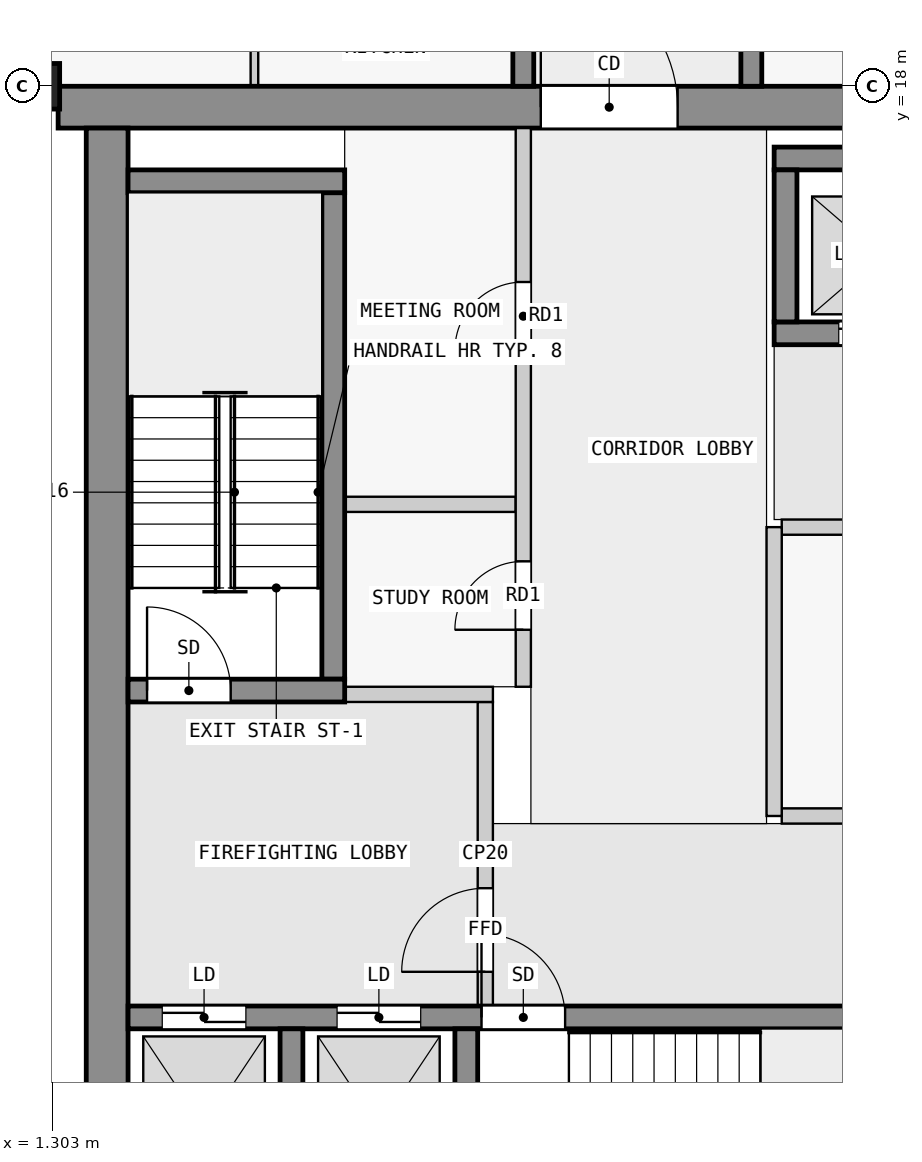
"""IFC4 building model, lengths in metres.
Left out: names, types, materials, properties, quantities, classifications, styles, units other than length and angle.
Written with IfcOpenShell. Run it as: python <this file> out.ifc"""

import sys

from ifc_helpers import new_model, si_unit, direction, frame, frame_2d, origin, origin_2d, place, context, subcontext, project, spatial, rectangle, extrude, element, fill, save


model = new_model("IFC4")
c1 = context("Model", 3, precision=1e-05, world=origin(), true_north=direction((0.0, 1.0)))
c2 = subcontext(c1, "Body", "Model", "MODEL_VIEW")
j1 = project(units=[si_unit("LENGTHUNIT", "METRE"), si_unit("PLANEANGLEUNIT", "RADIAN")], contexts=[c1])
p1 = place(None, origin())
s1 = spatial("IfcSite", under=j1, at=p1, CompositionType="ELEMENT")
p2 = place(p1, origin())
s2 = spatial("IfcBuilding", under=s1, at=p2, CompositionType="ELEMENT")
p3 = place(p2, frame((0.0, 0.0, 204.9)))
s3 = spatial("IfcBuildingStorey", under=s2, at=p3, CompositionType="ELEMENT", Elevation=204.9)
p4 = place(p3, frame((0.7, 18.0, 0.0), z_axis=(0.0, 0.0, 1.0), x_axis=(0.0, 1.0, 0.0)))
e1 = element("IfcColumn", 1, at=p4, inside=s3, PredefinedType="COLUMN", context=c2, shape_type="SweptSolid", body=[
    extrude(rectangle(XDim=0.6, YDim=1.4, at=origin_2d()), origin(), (0.0, 0.0, 1.0), 3.5),
])
p5 = place(p3, frame((1.38, 17.725, 0.0), z_axis=(0.0, 0.0, 1.0), x_axis=(1.0, 0.0, 0.0)))
e2 = element("IfcWall", 2, at=p5, inside=s3, PredefinedType="SHEAR", context=c2, shape_type="SweptSolid", body=[
    extrude(rectangle(XDim=21.12, YDim=0.55, at=frame_2d((10.56, 0.0))), origin(), (0.0, 0.0, 1.0), 3.25),
])
p6 = place(p5, frame((6.35, 0.0, 0.0)))
e3 = element("IfcOpeningElement", 3, at=p6, cuts=e2, PredefinedType="OPENING", context=c2, shape_type="SweptSolid", body=[
    extrude(rectangle(XDim=1.8, YDim=2.1, at=frame_2d((0.9, 1.05))), frame((0.0, 0.285, 0.0), z_axis=(0.0, -1.0, 0.0), x_axis=(1.0, 0.0, 0.0)), (0.0, 0.0, 1.0), 0.57),
])
p7 = place(p3, frame((2.025, 2.5, 0.0), z_axis=(0.0, 0.0, 1.0), x_axis=(0.0, 1.0, 0.0)))
e4 = element("IfcWall", 4, at=p7, inside=s3, PredefinedType="SHEAR", context=c2, shape_type="SweptSolid", body=[
    extrude(rectangle(XDim=14.95, YDim=0.55, at=frame_2d((7.475, 0.0))), origin(), (0.0, 0.0, 1.0), 3.25),
])
for number, where, z_axis, x_axis in (
    (5, (4.45, 2.8, 0.0), (0.0, 0.0, 1.0), (0.0, 1.0, 0.0)),
    (6, (6.75, 2.8, 0.0), (0.0, 0.0, 1.0), (0.0, 1.0, 0.0)),
):
    element("IfcWall", number, at=place(p3, frame(where, z_axis=z_axis, x_axis=x_axis)), inside=s3, PredefinedType="SHEAR", context=c2, shape_type="SweptSolid", body=[
        extrude(rectangle(XDim=2.8, YDim=0.3, at=frame_2d((1.4, 0.0))), origin(), (0.0, 0.0, 1.0), 3.25),
    ])
p8 = place(p3, frame((2.3, 5.75, 0.0), z_axis=(0.0, 0.0, 1.0), x_axis=(1.0, 0.0, 0.0)))
e7 = element("IfcWall", 7, at=p8, inside=s3, PredefinedType="SHEAR", context=c2, shape_type="SweptSolid", body=[
    extrude(rectangle(XDim=18.8, YDim=0.3, at=frame_2d((9.4, 0.0))), origin(), (0.0, 0.0, 1.0), 3.25),
])
p9 = place(p8, frame((4.65, 0.0, 0.0)))
e8 = element("IfcOpeningElement", 8, at=p9, cuts=e7, PredefinedType="OPENING", context=c2, shape_type="SweptSolid", body=[
    extrude(rectangle(XDim=1.1, YDim=2.1, at=frame_2d((0.55, 1.05))), frame((0.0, 0.16, 0.0), z_axis=(0.0, -1.0, 0.0), x_axis=(1.0, 0.0, 0.0)), (0.0, 0.0, 1.0), 0.32),
])
p10 = place(p8, frame((0.45, 0.0, 0.0)))
e9 = element("IfcOpeningElement", 9, at=p10, cuts=e7, PredefinedType="OPENING", context=c2, shape_type="SweptSolid", body=[
    extrude(rectangle(XDim=1.1, YDim=2.1, at=frame_2d((0.55, 1.05))), frame((0.0, 0.16, 0.0), z_axis=(0.0, -1.0, 0.0), x_axis=(1.0, 0.0, 0.0)), (0.0, 0.0, 1.0), 0.32),
])
p11 = place(p8, frame((2.75, 0.0, 0.0)))
e10 = element("IfcOpeningElement", 10, at=p11, cuts=e7, PredefinedType="OPENING", context=c2, shape_type="SweptSolid", body=[
    extrude(rectangle(XDim=1.1, YDim=2.1, at=frame_2d((0.55, 1.05))), frame((0.0, 0.16, 0.0), z_axis=(0.0, -1.0, 0.0), x_axis=(1.0, 0.0, 0.0)), (0.0, 0.0, 1.0), 0.32),
])
p12 = place(p8, frame((13.2, 0.0, 0.0)))
e11 = element("IfcOpeningElement", 11, at=p12, cuts=e7, PredefinedType="OPENING", context=c2, shape_type="SweptSolid", body=[
    extrude(rectangle(XDim=0.9, YDim=2.1, at=frame_2d((0.45, 1.05))), frame((0.0, 0.16, 0.0), z_axis=(0.0, -1.0, 0.0), x_axis=(1.0, 0.0, 0.0)), (0.0, 0.0, 1.0), 0.32),
])
p13 = place(p8, frame((16.95, 0.0, 0.0)))
e12 = element("IfcOpeningElement", 12, at=p13, cuts=e7, PredefinedType="OPENING", context=c2, shape_type="SweptSolid", body=[
    extrude(rectangle(XDim=0.9, YDim=2.1, at=frame_2d((0.45, 1.05))), frame((0.0, 0.16, 0.0), z_axis=(0.0, -1.0, 0.0), x_axis=(1.0, 0.0, 0.0)), (0.0, 0.0, 1.0), 0.32),
])
p14 = place(p3, frame((2.3, 10.05, 0.0), z_axis=(0.0, 0.0, 1.0), x_axis=(1.0, 0.0, 0.0)))
e13 = element("IfcWall", 13, at=p14, inside=s3, PredefinedType="SHEAR", context=c2, shape_type="SweptSolid", body=[
    extrude(rectangle(XDim=2.85, YDim=0.3, at=frame_2d((1.425, 0.0))), origin(), (0.0, 0.0, 1.0), 3.25),
])
p15 = place(p14, frame((0.25, 0.0, 0.0)))
e14 = element("IfcOpeningElement", 14, at=p15, cuts=e13, PredefinedType="OPENING", context=c2, shape_type="SweptSolid", body=[
    extrude(rectangle(XDim=1.1, YDim=2.1, at=frame_2d((0.55, 1.05))), frame((0.0, 0.16, 0.0), z_axis=(0.0, -1.0, 0.0), x_axis=(1.0, 0.0, 0.0)), (0.0, 0.0, 1.0), 0.32),
])
p16 = place(p3, frame((5.0, 10.2, 0.0), z_axis=(0.0, 0.0, 1.0), x_axis=(0.0, 1.0, 0.0)))
e15 = element("IfcWall", 15, at=p16, inside=s3, PredefinedType="SHEAR", context=c2, shape_type="SweptSolid", body=[
    extrude(rectangle(XDim=6.4, YDim=0.3, at=frame_2d((3.2, 0.0))), origin(), (0.0, 0.0, 1.0), 3.25),
])
p17 = place(p3, frame((2.3, 16.75, 0.0), z_axis=(0.0, 0.0, 1.0), x_axis=(1.0, 0.0, 0.0)))
e16 = element("IfcWall", 16, at=p17, inside=s3, PredefinedType="SHEAR", context=c2, shape_type="SweptSolid", body=[
    extrude(rectangle(XDim=2.85, YDim=0.3, at=frame_2d((1.425, 0.0))), origin(), (0.0, 0.0, 1.0), 3.25),
])
p18 = place(p3, frame((10.8, 17.05, 0.0), z_axis=(0.0, 0.0, 1.0), x_axis=(1.0, 0.0, 0.0)))
e17 = element("IfcWall", 17, at=p18, inside=s3, PredefinedType="SHEAR", context=c2, shape_type="SweptSolid", body=[
    extrude(rectangle(XDim=7.8, YDim=0.3, at=frame_2d((3.9, 0.0))), origin(), (0.0, 0.0, 1.0), 3.25),
])
p19 = place(p3, frame((10.8, 14.75, 0.0), z_axis=(0.0, 0.0, 1.0), x_axis=(1.0, 0.0, 0.0)))
e18 = element("IfcWall", 18, at=p19, inside=s3, PredefinedType="SHEAR", context=c2, shape_type="SweptSolid", body=[
    extrude(rectangle(XDim=7.8, YDim=0.3, at=frame_2d((3.9, 0.0))), origin(), (0.0, 0.0, 1.0), 3.25),
])
p20 = place(p19, frame((0.85, 0.0, 0.0)))
e19 = element("IfcOpeningElement", 19, at=p20, cuts=e18, PredefinedType="OPENING", context=c2, shape_type="SweptSolid", body=[
    extrude(rectangle(XDim=1.1, YDim=2.1, at=frame_2d((0.55, 1.05))), frame((0.0, 0.16, 0.0), z_axis=(0.0, -1.0, 0.0), x_axis=(1.0, 0.0, 0.0)), (0.0, 0.0, 1.0), 0.32),
])
p21 = place(p19, frame((3.35, 0.0, 0.0)))
e20 = element("IfcOpeningElement", 20, at=p21, cuts=e18, PredefinedType="OPENING", context=c2, shape_type="SweptSolid", body=[
    extrude(rectangle(XDim=1.1, YDim=2.1, at=frame_2d((0.55, 1.05))), frame((0.0, 0.16, 0.0), z_axis=(0.0, -1.0, 0.0), x_axis=(1.0, 0.0, 0.0)), (0.0, 0.0, 1.0), 0.32),
])
p22 = place(p19, frame((5.85, 0.0, 0.0)))
e21 = element("IfcOpeningElement", 21, at=p22, cuts=e18, PredefinedType="OPENING", context=c2, shape_type="SweptSolid", body=[
    extrude(rectangle(XDim=1.1, YDim=2.1, at=frame_2d((0.55, 1.05))), frame((0.0, 0.16, 0.0), z_axis=(0.0, -1.0, 0.0), x_axis=(1.0, 0.0, 0.0)), (0.0, 0.0, 1.0), 0.32),
])
p23 = place(p3, frame((10.95, 14.9, 0.0), z_axis=(0.0, 0.0, 1.0), x_axis=(0.0, 1.0, 0.0)))
e22 = element("IfcWall", 22, at=p23, inside=s3, PredefinedType="SHEAR", context=c2, shape_type="SweptSolid", body=[
    extrude(rectangle(XDim=2.0, YDim=0.3, at=frame_2d((1.0, 0.0))), origin(), (0.0, 0.0, 1.0), 3.25),
])
p24 = place(p3, frame((7.5, 18.0, 0.0), z_axis=(0.0, 0.0, 1.0), x_axis=(0.0, 1.0, 0.0)))
e23 = element("IfcWall", 23, at=p24, inside=s3, PredefinedType="SHEAR", context=c2, shape_type="SweptSolid", body=[
    extrude(rectangle(XDim=27.0, YDim=0.275, at=frame_2d((13.5, 0.0))), origin(), (0.0, 0.0, 1.0), 3.25),
])
p25 = place(p24, frame((1.75, 0.0, 0.0)))
e24 = element("IfcOpeningElement", 24, at=p25, cuts=e23, PredefinedType="OPENING", context=c2, shape_type="SweptSolid", body=[
    extrude(rectangle(XDim=1.0, YDim=2.1, at=frame_2d((0.5, 1.05))), frame((0.0, 0.147, 0.0), z_axis=(0.0, -1.0, 0.0), x_axis=(1.0, 0.0, 0.0)), (0.0, 0.0, 1.0), 0.295),
])
p26 = place(p24, frame((5.85, 0.0, 0.0)))
e25 = element("IfcOpeningElement", 25, at=p26, cuts=e23, PredefinedType="OPENING", context=c2, shape_type="SweptSolid", body=[
    extrude(rectangle(XDim=1.8, YDim=2.1, at=frame_2d((0.9, 1.05))), frame((0.0, 0.147, 0.0), z_axis=(0.0, -1.0, 0.0), x_axis=(1.0, 0.0, 0.0)), (0.0, 0.0, 1.0), 0.295),
])
p27 = place(p24, frame((13.05, 0.0, 0.0)))
e26 = element("IfcOpeningElement", 26, at=p27, cuts=e23, PredefinedType="OPENING", context=c2, shape_type="SweptSolid", body=[
    extrude(rectangle(XDim=1.0, YDim=2.1, at=frame_2d((0.5, 1.05))), frame((0.0, 0.147, 0.0), z_axis=(0.0, -1.0, 0.0), x_axis=(1.0, 0.0, 0.0)), (0.0, 0.0, 1.0), 0.295),
])
p28 = place(p24, frame((19.75, 0.0, 0.0)))
e27 = element("IfcOpeningElement", 27, at=p28, cuts=e23, PredefinedType="OPENING", context=c2, shape_type="SweptSolid", body=[
    extrude(rectangle(XDim=1.0, YDim=2.1, at=frame_2d((0.5, 1.05))), frame((0.0, 0.147, 0.0), z_axis=(0.0, -1.0, 0.0), x_axis=(1.0, 0.0, 0.0)), (0.0, 0.0, 1.0), 0.295),
])
p29 = place(p24, frame((23.25, 0.0, 0.0)))
e28 = element("IfcOpeningElement", 28, at=p29, cuts=e23, PredefinedType="OPENING", context=c2, shape_type="SweptSolid", body=[
    extrude(rectangle(XDim=0.9, YDim=2.1, at=frame_2d((0.45, 1.05))), frame((0.0, 0.147, 0.0), z_axis=(0.0, -1.0, 0.0), x_axis=(1.0, 0.0, 0.0)), (0.0, 0.0, 1.0), 0.295),
])
p30 = place(p24, frame((25.45, 0.0, 0.0)))
e29 = element("IfcOpeningElement", 29, at=p30, cuts=e23, PredefinedType="OPENING", context=c2, shape_type="SweptSolid", body=[
    extrude(rectangle(XDim=1.0, YDim=2.1, at=frame_2d((0.5, 1.05))), frame((0.0, 0.147, 0.0), z_axis=(0.0, -1.0, 0.0), x_axis=(1.0, 0.0, 0.0)), (0.0, 0.0, 1.0), 0.295),
])
p31 = place(p3, frame((10.5, 18.0, 0.0), z_axis=(0.0, 0.0, 1.0), x_axis=(0.0, 1.0, 0.0)))
e30 = element("IfcWall", 30, at=p31, inside=s3, PredefinedType="SHEAR", context=c2, shape_type="SweptSolid", body=[
    extrude(rectangle(XDim=27.0, YDim=0.275, at=frame_2d((13.5, 0.0))), origin(), (0.0, 0.0, 1.0), 3.25),
])
p32 = place(p31, frame((4.85, 0.0, 0.0)))
e31 = element("IfcOpeningElement", 31, at=p32, cuts=e30, PredefinedType="OPENING", context=c2, shape_type="SweptSolid", body=[
    extrude(rectangle(XDim=1.0, YDim=2.1, at=frame_2d((0.5, 1.05))), frame((0.0, 0.147, 0.0), z_axis=(0.0, -1.0, 0.0), x_axis=(1.0, 0.0, 0.0)), (0.0, 0.0, 1.0), 0.295),
])
p33 = place(p31, frame((15.25, 0.0, 0.0)))
e32 = element("IfcOpeningElement", 32, at=p33, cuts=e30, PredefinedType="OPENING", context=c2, shape_type="SweptSolid", body=[
    extrude(rectangle(XDim=1.0, YDim=2.1, at=frame_2d((0.5, 1.05))), frame((0.0, 0.147, 0.0), z_axis=(0.0, -1.0, 0.0), x_axis=(1.0, 0.0, 0.0)), (0.0, 0.0, 1.0), 0.295),
])
p34 = place(p31, frame((21.35, 0.0, 0.0)))
e33 = element("IfcOpeningElement", 33, at=p34, cuts=e30, PredefinedType="OPENING", context=c2, shape_type="SweptSolid", body=[
    extrude(rectangle(XDim=1.0, YDim=2.1, at=frame_2d((0.5, 1.05))), frame((0.0, 0.147, 0.0), z_axis=(0.0, -1.0, 0.0), x_axis=(1.0, 0.0, 0.0)), (0.0, 0.0, 1.0), 0.295),
])
p35 = place(p3, frame((7.0, 5.9, 0.0), z_axis=(0.0, 0.0, 1.0), x_axis=(0.0, 1.0, 0.0)))
e34 = element("IfcWall", 34, at=p35, inside=s3, PredefinedType="PARTITIONING", context=c2, shape_type="SweptSolid", body=[
    extrude(rectangle(XDim=4.0, YDim=0.2, at=frame_2d((2.0, 0.0))), origin(), (0.0, 0.0, 1.0), 3.25),
])
p36 = place(p35, frame((0.45, 0.0, 0.0)))
e35 = element("IfcOpeningElement", 35, at=p36, cuts=e34, PredefinedType="OPENING", context=c2, shape_type="SweptSolid", body=[
    extrude(rectangle(XDim=1.1, YDim=2.1, at=frame_2d((0.55, 1.05))), frame((0.0, 0.11, 0.0), z_axis=(0.0, -1.0, 0.0), x_axis=(1.0, 0.0, 0.0)), (0.0, 0.0, 1.0), 0.22),
])
p37 = place(p3, frame((5.15, 10.0, 0.0), z_axis=(0.0, 0.0, 1.0), x_axis=(1.0, 0.0, 0.0)))
e36 = element("IfcWall", 36, at=p37, inside=s3, PredefinedType="PARTITIONING", context=c2, shape_type="SweptSolid", body=[
    extrude(rectangle(XDim=1.95, YDim=0.2, at=frame_2d((0.975, 0.0))), origin(), (0.0, 0.0, 1.0), 3.25),
])
p38 = place(p3, frame((10.8, 8.4, 0.0), z_axis=(0.0, 0.0, 1.0), x_axis=(0.0, 1.0, 0.0)))
e37 = element("IfcWall", 37, at=p38, inside=s3, PredefinedType="PARTITIONING", context=c2, shape_type="SweptSolid", body=[
    extrude(rectangle(XDim=3.8, YDim=0.2, at=frame_2d((1.9, 0.0))), origin(), (0.0, 0.0, 1.0), 3.25),
])
p39 = place(p3, frame((10.9, 8.4, 0.0), z_axis=(0.0, 0.0, 1.0), x_axis=(1.0, 0.0, 0.0)))
e38 = element("IfcWall", 38, at=p39, inside=s3, PredefinedType="PARTITIONING", context=c2, shape_type="SweptSolid", body=[
    extrude(rectangle(XDim=8.55, YDim=0.2, at=frame_2d((4.275, 0.0))), origin(), (0.0, 0.0, 1.0), 3.25),
])
p40 = place(p3, frame((10.9, 12.2, 0.0), z_axis=(0.0, 0.0, 1.0), x_axis=(1.0, 0.0, 0.0)))
e39 = element("IfcWall", 39, at=p40, inside=s3, PredefinedType="PARTITIONING", context=c2, shape_type="SweptSolid", body=[
    extrude(rectangle(XDim=8.55, YDim=0.2, at=frame_2d((4.275, 0.0))), origin(), (0.0, 0.0, 1.0), 3.25),
])
p41 = place(p40, frame((3.825, 0.0, 0.0)))
e40 = element("IfcOpeningElement", 40, at=p41, cuts=e39, PredefinedType="OPENING", context=c2, shape_type="SweptSolid", body=[
    extrude(rectangle(XDim=0.9, YDim=2.1, at=frame_2d((0.45, 1.05))), frame((0.0, 0.11, 0.0), z_axis=(0.0, -1.0, 0.0), x_axis=(1.0, 0.0, 0.0)), (0.0, 0.0, 1.0), 0.22),
])
p42 = place(p3, frame((7.5, 10.1, 0.0), z_axis=(0.0, 0.0, 1.0), x_axis=(0.0, 1.0, 0.0)))
e41 = element("IfcWall", 41, at=p42, inside=s3, PredefinedType="PARTITIONING", context=c2, shape_type="SweptSolid", body=[
    extrude(rectangle(XDim=7.35, YDim=0.2, at=frame_2d((3.675, 0.0))), origin(), (0.0, 0.0, 1.0), 3.25),
])
p43 = place(p42, frame((0.75, 0.0, 0.0)))
e42 = element("IfcOpeningElement", 42, at=p43, cuts=e41, PredefinedType="OPENING", context=c2, shape_type="SweptSolid", body=[
    extrude(rectangle(XDim=0.9, YDim=2.1, at=frame_2d((0.45, 1.05))), frame((0.0, 0.11, 0.0), z_axis=(0.0, -1.0, 0.0), x_axis=(1.0, 0.0, 0.0)), (0.0, 0.0, 1.0), 0.22),
])
p44 = place(p42, frame((4.425, 0.0, 0.0)))
e43 = element("IfcOpeningElement", 43, at=p44, cuts=e41, PredefinedType="OPENING", context=c2, shape_type="SweptSolid", body=[
    extrude(rectangle(XDim=0.9, YDim=2.1, at=frame_2d((0.45, 1.05))), frame((0.0, 0.11, 0.0), z_axis=(0.0, -1.0, 0.0), x_axis=(1.0, 0.0, 0.0)), (0.0, 0.0, 1.0), 0.22),
])
p45 = place(p3, frame((5.15, 12.5, 0.0), z_axis=(0.0, 0.0, 1.0), x_axis=(1.0, 0.0, 0.0)))
e44 = element("IfcWall", 44, at=p45, inside=s3, PredefinedType="PARTITIONING", context=c2, shape_type="SweptSolid", body=[
    extrude(rectangle(XDim=2.25, YDim=0.2, at=frame_2d((1.125, 0.0))), origin(), (0.0, 0.0, 1.0), 3.25),
])
p46 = place(p3, frame((3.962, 19.45, 0.0), z_axis=(0.0, 0.0, 1.0), x_axis=(0.0, -1.0, 0.0)))
e45 = element("IfcWall", 45, at=p46, inside=s3, PredefinedType="PARTITIONING", context=c2, shape_type="SweptSolid", body=[
    extrude(rectangle(XDim=1.45, YDim=0.1, at=frame_2d((0.725, 0.0))), origin(), (0.0, 0.0, 1.0), 3.25),
])
p47 = place(p36, origin())
e46 = element("IfcDoor", 46, at=p47, inside=s3, OperationType="SINGLE_SWING_LEFT", PredefinedType="DOOR", context=c2, shape_type="SweptSolid", body=[
    extrude(rectangle(XDim=1.1, YDim=2.1, at=frame_2d((0.55, 1.05))), frame((0.0, 0.025, 0.0), z_axis=(0.0, -1.0, 0.0), x_axis=(1.0, 0.0, 0.0)), (0.0, 0.0, 1.0), 0.05),
])
fill(e35, e46)
p48 = place(p15, origin())
e47 = element("IfcDoor", 47, at=p48, inside=s3, OperationType="SINGLE_SWING_RIGHT", PredefinedType="DOOR", context=c2, shape_type="SweptSolid", body=[
    extrude(rectangle(XDim=1.1, YDim=2.1, at=frame_2d((0.55, 1.05))), frame((0.0, 0.025, 0.0), z_axis=(0.0, -1.0, 0.0), x_axis=(1.0, 0.0, 0.0)), (0.0, 0.0, 1.0), 0.05),
])
fill(e14, e47)
p49 = place(p9, origin())
e48 = element("IfcDoor", 48, at=p49, inside=s3, OperationType="SINGLE_SWING_LEFT", PredefinedType="DOOR", context=c2, shape_type="SweptSolid", body=[
    extrude(rectangle(XDim=1.1, YDim=2.1, at=frame_2d((0.55, 1.05))), frame((0.0, 0.025, 0.0), z_axis=(0.0, -1.0, 0.0), x_axis=(1.0, 0.0, 0.0)), (0.0, 0.0, 1.0), 0.05),
])
fill(e8, e48)
p50 = place(p10, origin())
e49 = element("IfcDoor", 49, at=p50, inside=s3, OperationType="DOUBLE_DOOR_SLIDING", PredefinedType="DOOR", context=c2, shape_type="SweptSolid", body=[
    extrude(rectangle(XDim=1.1, YDim=2.1, at=frame_2d((0.55, 1.05))), frame((0.0, 0.025, 0.0), z_axis=(0.0, -1.0, 0.0), x_axis=(1.0, 0.0, 0.0)), (0.0, 0.0, 1.0), 0.05),
])
fill(e9, e49)
p51 = place(p11, origin())
e50 = element("IfcDoor", 50, at=p51, inside=s3, OperationType="DOUBLE_DOOR_SLIDING", PredefinedType="DOOR", context=c2, shape_type="SweptSolid", body=[
    extrude(rectangle(XDim=1.1, YDim=2.1, at=frame_2d((0.55, 1.05))), frame((0.0, 0.025, 0.0), z_axis=(0.0, -1.0, 0.0), x_axis=(1.0, 0.0, 0.0)), (0.0, 0.0, 1.0), 0.05),
])
fill(e10, e50)
p52 = place(p20, origin())
e51 = element("IfcDoor", 51, at=p52, inside=s3, OperationType="DOUBLE_DOOR_SLIDING", PredefinedType="DOOR", context=c2, shape_type="SweptSolid", body=[
    extrude(rectangle(XDim=1.1, YDim=2.1, at=frame_2d((0.55, 1.05))), frame((0.0, 0.025, 0.0), z_axis=(0.0, -1.0, 0.0), x_axis=(1.0, 0.0, 0.0)), (0.0, 0.0, 1.0), 0.05),
])
fill(e19, e51)
p53 = place(p6, origin())
e52 = element("IfcDoor", 52, at=p53, inside=s3, OperationType="DOUBLE_DOOR_SINGLE_SWING", PredefinedType="DOOR", context=c2, shape_type="SweptSolid", body=[
    extrude(rectangle(XDim=1.8, YDim=2.1, at=frame_2d((0.9, 1.05))), frame((0.0, 0.025, 0.0), z_axis=(0.0, -1.0, 0.0), x_axis=(1.0, 0.0, 0.0)), (0.0, 0.0, 1.0), 0.05),
])
fill(e3, e52)
p54 = place(p43, origin())
e53 = element("IfcDoor", 53, at=p54, inside=s3, OperationType="SINGLE_SWING_RIGHT", PredefinedType="DOOR", context=c2, shape_type="SweptSolid", body=[
    extrude(rectangle(XDim=0.9, YDim=2.1, at=frame_2d((0.45, 1.05))), frame((0.0, 0.025, 0.0), z_axis=(0.0, -1.0, 0.0), x_axis=(1.0, 0.0, 0.0)), (0.0, 0.0, 1.0), 0.05),
])
fill(e42, e53)
p55 = place(p44, origin())
e54 = element("IfcDoor", 54, at=p55, inside=s3, OperationType="SINGLE_SWING_RIGHT", PredefinedType="DOOR", context=c2, shape_type="SweptSolid", body=[
    extrude(rectangle(XDim=0.9, YDim=2.1, at=frame_2d((0.45, 1.05))), frame((0.0, 0.025, 0.0), z_axis=(0.0, -1.0, 0.0), x_axis=(1.0, 0.0, 0.0)), (0.0, 0.0, 1.0), 0.05),
])
fill(e43, e54)
save(model, sys.argv[1])
